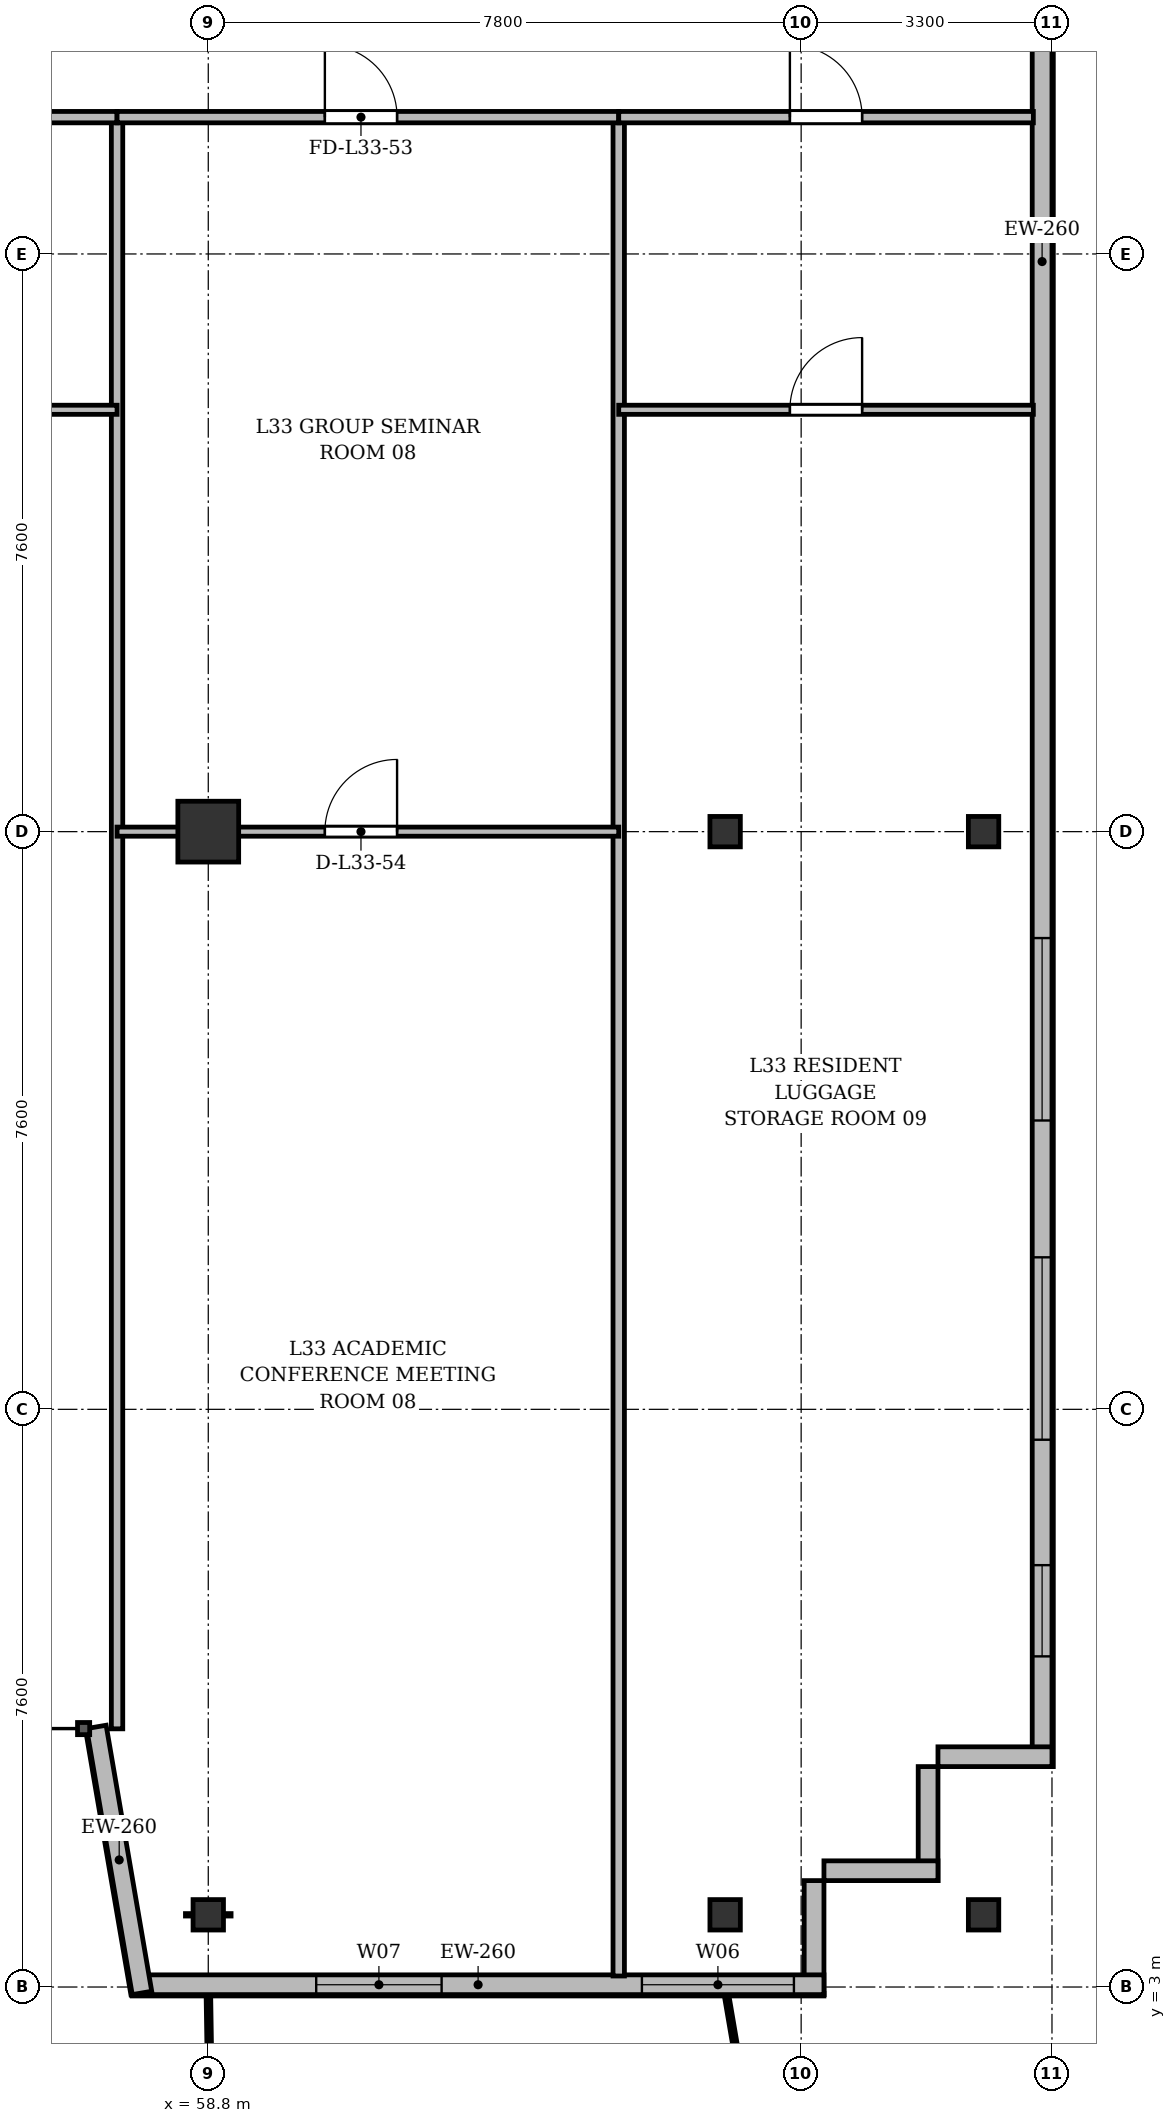
"""IFC4 building model, lengths in metres.
Left out: names, types, materials, properties, quantities, classifications, styles, units other than length and angle.
Written with IfcOpenShell. Run it as: python <this file> out.ifc"""

import sys

from ifc_helpers import new_model, si_unit, direction, frame, frame_2d, origin, origin_2d, place, context, subcontext, project, spatial, rectangle, i_section, extrude, source, transform, mapped, element, fill, save


model = new_model("IFC4")
c1 = context("Model", 3, precision=1e-05, world=origin(), true_north=direction((0.0, 1.0)))
c2 = subcontext(c1, "Body", "Model", "MODEL_VIEW")
j1 = project(units=[si_unit("LENGTHUNIT", "METRE"), si_unit("PLANEANGLEUNIT", "RADIAN")], contexts=[c1])
p1 = place(None, origin())
s1 = spatial("IfcSite", under=j1, at=p1, CompositionType="ELEMENT")
p2 = place(p1, origin())
s2 = spatial("IfcBuilding", under=s1, at=p2, CompositionType="ELEMENT")
p3 = place(p2, frame((0.0, 0.0, 128.5)))
s3 = spatial("IfcBuildingStorey", under=s2, at=p3, CompositionType="ELEMENT", Elevation=128.5)
m1 = source(origin(), c2, "Body", "SweptSolid", [
    extrude(i_section(OverallWidth=0.4, OverallDepth=0.4, WebThickness=0.022, FlangeThickness=0.035, at=origin_2d()), origin(), (0.0, 0.0, 1.0), 3.6),
])
p4 = place(p3, frame((58.8, 3.95, 0.0), z_axis=(0.0, 0.0, 1.0), x_axis=(1.0, 0.0, 0.0)))
e1 = element("IfcColumn", 1, at=p4, inside=s3, PredefinedType="COLUMN", context=c2, shape_type="MappedRepresentation", body=[
    mapped(m1, transform((0.0, 0.0, 0.0), x_axis=(1.0, 0.0, 0.0), y_axis=(0.0, 1.0, 0.0), z_axis=(0.0, 0.0, 1.0), scale=1.0)),
])
m2 = source(origin(), c2, "Body", "SweptSolid", [
    extrude(rectangle(XDim=0.8, YDim=0.8, at=origin_2d()), origin(), (0.0, 0.0, 1.0), 3.6),
])
p5 = place(p3, frame((58.8, 18.2, 0.0), z_axis=(0.0, 0.0, 1.0), x_axis=(1.0, 0.0, 0.0)))
e2 = element("IfcColumn", 2, at=p5, inside=s3, PredefinedType="COLUMN", context=c2, shape_type="MappedRepresentation", body=[
    mapped(m2, transform((0.0, 0.0, 0.0), x_axis=(1.0, 0.0, 0.0), y_axis=(0.0, 1.0, 0.0), z_axis=(0.0, 0.0, 1.0), scale=1.0)),
])
for number, where, z_axis, x_axis in (
    (3, (65.6, 3.95, 0.0), (0.0, 0.0, 1.0), (1.0, 0.0, 0.0)),
    (4, (65.6, 18.2, 0.0), (0.0, 0.0, 1.0), (1.0, 0.0, 0.0)),
    (5, (69.0, 3.95, 0.0), (0.0, 0.0, 1.0), (1.0, 0.0, 0.0)),
    (6, (69.0, 18.2, 0.0), (0.0, 0.0, 1.0), (1.0, 0.0, 0.0)),
):
    element("IfcColumn", number, at=place(p3, frame(where, z_axis=z_axis, x_axis=x_axis)), inside=s3, PredefinedType="COLUMN", context=c2, shape_type="MappedRepresentation", body=[
        mapped(m1, transform((0.0, 0.0, 0.0), x_axis=(1.0, 0.0, 0.0), y_axis=(0.0, 1.0, 0.0), z_axis=(0.0, 0.0, 1.0), scale=1.0)),
    ])
p6 = place(p3, frame((69.77, 45.5, 0.0), z_axis=(0.0, 0.0, 1.0), x_axis=(0.0, -1.0, 0.0)))
e7 = element("IfcWall", 7, at=p6, inside=s3, PredefinedType="SOLIDWALL", context=c2, shape_type="SweptSolid", body=[
    extrude(rectangle(XDim=39.6, YDim=0.26, at=frame_2d((19.8, 0.0))), origin(), (0.0, 0.0, 1.0), 2.632),
])
p7 = place(p6, frame((36.95, 0.0, 0.92)))
e8 = element("IfcOpeningElement", 8, at=p7, cuts=e7, PredefinedType="OPENING", context=c2, shape_type="SweptSolid", body=[
    extrude(rectangle(XDim=1.2, YDim=1.61, at=frame_2d((0.6, 0.805))), frame((0.0, 0.14, 0.0), z_axis=(0.0, -1.0, 0.0), x_axis=(1.0, 0.0, 0.0)), (0.0, 0.0, 1.0), 0.28),
])
p8 = place(p6, frame((32.9, 0.0, 0.92)))
e9 = element("IfcOpeningElement", 9, at=p8, cuts=e7, PredefinedType="OPENING", context=c2, shape_type="SweptSolid", body=[
    extrude(rectangle(XDim=2.4, YDim=1.61, at=frame_2d((1.2, 0.805))), frame((0.0, 0.14, 0.0), z_axis=(0.0, -1.0, 0.0), x_axis=(1.0, 0.0, 0.0)), (0.0, 0.0, 1.0), 0.28),
])
p9 = place(p6, frame((28.7, 0.0, 0.92)))
e10 = element("IfcOpeningElement", 10, at=p9, cuts=e7, PredefinedType="OPENING", context=c2, shape_type="SweptSolid", body=[
    extrude(rectangle(XDim=2.4, YDim=1.61, at=frame_2d((1.2, 0.805))), frame((0.0, 0.14, 0.0), z_axis=(0.0, -1.0, 0.0), x_axis=(1.0, 0.0, 0.0)), (0.0, 0.0, 1.0), 0.28),
])
p10 = place(p6, frame((7.5, 0.0, 0.92)))
e11 = element("IfcOpeningElement", 11, at=p10, cuts=e7, PredefinedType="OPENING", context=c2, shape_type="SweptSolid", body=[
    extrude(rectangle(XDim=2.4, YDim=1.61, at=frame_2d((1.2, 0.805))), frame((0.0, 0.14, 0.0), z_axis=(0.0, -1.0, 0.0), x_axis=(1.0, 0.0, 0.0)), (0.0, 0.0, 1.0), 0.28),
])
p11 = place(p6, frame((4.5, 0.0, 0.92)))
e12 = element("IfcOpeningElement", 12, at=p11, cuts=e7, PredefinedType="OPENING", context=c2, shape_type="SweptSolid", body=[
    extrude(rectangle(XDim=1.2, YDim=1.61, at=frame_2d((0.6, 0.805))), frame((0.0, 0.14, 0.0), z_axis=(0.0, -1.0, 0.0), x_axis=(1.0, 0.0, 0.0)), (0.0, 0.0, 1.0), 0.28),
])
p12 = place(p6, frame((1.15, 0.0, 0.92)))
e13 = element("IfcOpeningElement", 13, at=p12, cuts=e7, PredefinedType="OPENING", context=c2, shape_type="SweptSolid", body=[
    extrude(rectangle(XDim=1.2, YDim=1.61, at=frame_2d((0.6, 0.805))), frame((0.0, 0.14, 0.0), z_axis=(0.0, -1.0, 0.0), x_axis=(1.0, 0.0, 0.0)), (0.0, 0.0, 1.0), 0.28),
])
p13 = place(p3, frame((69.9, 6.03, 0.0), z_axis=(0.0, 0.0, 1.0), x_axis=(-1.0, 0.0, 0.0)))
e14 = element("IfcWall", 14, at=p13, inside=s3, PredefinedType="SOLIDWALL", context=c2, shape_type="SweptSolid", body=[
    extrude(rectangle(XDim=1.5, YDim=0.26, at=frame_2d((0.75, 0.0))), origin(), (0.0, 0.0, 1.0), 2.72),
])
for number, where, z_axis, x_axis in (
    (15, (68.27, 5.9, 0.0), (0.0, 0.0, 1.0), (0.0, -1.0, 0.0)),
    (16, (68.4, 4.53, 0.0), (0.0, 0.0, 1.0), (-1.0, 0.0, 0.0)),
):
    element("IfcWall", number, at=place(p3, frame(where, z_axis=z_axis, x_axis=x_axis)), inside=s3, PredefinedType="SOLIDWALL", context=c2, shape_type="SweptSolid", body=[
        extrude(rectangle(XDim=1.5, YDim=0.26, at=frame_2d((0.75, 0.0))), origin(), (0.0, 0.0, 1.0), 3.22),
    ])
p14 = place(p3, frame((66.77, 4.4, 0.0), z_axis=(0.0, 0.0, 1.0), x_axis=(0.0, -1.0, 0.0)))
e17 = element("IfcWall", 17, at=p14, inside=s3, PredefinedType="SOLIDWALL", context=c2, shape_type="SweptSolid", body=[
    extrude(rectangle(XDim=1.5, YDim=0.26, at=frame_2d((0.75, 0.0))), origin(), (0.0, 0.0, 1.0), 2.632),
])
p15 = place(p3, frame((66.9, 3.03, 0.0), z_axis=(0.0, 0.0, 1.0), x_axis=(-1.0, 0.0, 0.0)))
e18 = element("IfcWall", 18, at=p15, inside=s3, PredefinedType="SOLIDWALL", context=c2, shape_type="SweptSolid", body=[
    extrude(rectangle(XDim=9.1, YDim=0.26, at=frame_2d((4.55, 0.0))), origin(), (0.0, 0.0, 1.0), 3.22),
])
p16 = place(p15, frame((0.395, 0.0, 0.9)))
e19 = element("IfcOpeningElement", 19, at=p16, cuts=e18, PredefinedType="OPENING", context=c2, shape_type="SweptSolid", body=[
    extrude(rectangle(XDim=2.0, YDim=1.95, at=frame_2d((1.0, 0.975))), frame((0.0, 0.14, 0.0), z_axis=(0.0, -1.0, 0.0), x_axis=(1.0, 0.0, 0.0)), (0.0, 0.0, 1.0), 0.28),
])
p17 = place(p15, frame((5.03, 0.0, 0.9)))
e20 = element("IfcOpeningElement", 20, at=p17, cuts=e18, PredefinedType="OPENING", context=c2, shape_type="SweptSolid", body=[
    extrude(rectangle(XDim=1.65, YDim=1.85, at=frame_2d((0.825, 0.925))), frame((0.0, 0.14, 0.0), z_axis=(0.0, -1.0, 0.0), x_axis=(1.0, 0.0, 0.0)), (0.0, 0.0, 1.0), 0.28),
])
p18 = place(p3, frame((57.928, 2.922, 0.0), z_axis=(0.0, 0.0, 1.0), x_axis=(-0.168923741424, 0.98562912375, 0.0)))
e21 = element("IfcWall", 21, at=p18, inside=s3, PredefinedType="SOLIDWALL", context=c2, shape_type="SweptSolid", body=[
    extrude(rectangle(XDim=3.551, YDim=0.26, at=frame_2d((1.775, 0.0))), origin(), (0.0, 0.0, 1.0), 2.632),
])
p19 = place(p3, frame((57.6, 6.397, 0.0), z_axis=(0.0, 0.0, 1.0), x_axis=(0.0, 1.0, 0.0)))
e22 = element("IfcWall", 22, at=p19, inside=s3, PredefinedType="PARTITIONING", context=c2, shape_type="SweptSolid", body=[
    extrude(rectangle(XDim=21.203, YDim=0.15, at=frame_2d((10.602, 0.0))), origin(), (0.0, 0.0, 1.0), 2.632),
])
p20 = place(p3, frame((64.2, 3.145, 0.0), z_axis=(0.0, 0.0, 1.0), x_axis=(0.0, 1.0, 0.0)))
e23 = element("IfcWall", 23, at=p20, inside=s3, PredefinedType="PARTITIONING", context=c2, shape_type="SweptSolid", body=[
    extrude(rectangle(XDim=24.455, YDim=0.15, at=frame_2d((12.228, 0.0))), origin(), (0.0, 0.0, 1.0), 2.632),
])
p21 = place(p3, frame((51.0, 27.6, 0.0), z_axis=(0.0, 0.0, 1.0), x_axis=(1.0, 0.0, 0.0)))
e24 = element("IfcWall", 24, at=p21, inside=s3, PredefinedType="PARTITIONING", context=c2, shape_type="SweptSolid", body=[
    extrude(rectangle(XDim=6.6, YDim=0.15, at=frame_2d((3.3, 0.0))), origin(), (0.0, 0.0, 1.0), 2.72),
])
p22 = place(p21, frame((2.734, 0.0, 0.0)))
e25 = element("IfcOpeningElement", 25, at=p22, cuts=e24, PredefinedType="OPENING", context=c2, shape_type="SweptSolid", body=[
    extrude(rectangle(XDim=0.95, YDim=2.15, at=frame_2d((0.475, 1.075))), frame((0.0, 0.085, 0.0), z_axis=(0.0, -1.0, 0.0), x_axis=(1.0, 0.0, 0.0)), (0.0, 0.0, 1.0), 0.17),
])
p23 = place(p3, frame((51.0, 23.75, 0.0), z_axis=(0.0, 0.0, 1.0), x_axis=(1.0, 0.0, 0.0)))
e26 = element("IfcWall", 26, at=p23, inside=s3, PredefinedType="PARTITIONING", context=c2, shape_type="SweptSolid", body=[
    extrude(rectangle(XDim=6.6, YDim=0.12, at=frame_2d((3.3, 0.0))), origin(), (0.0, 0.0, 1.0), 2.72),
])
p24 = place(p23, frame((2.734, 0.0, 0.0)))
e27 = element("IfcOpeningElement", 27, at=p24, cuts=e26, PredefinedType="OPENING", context=c2, shape_type="SweptSolid", body=[
    extrude(rectangle(XDim=0.95, YDim=2.15, at=frame_2d((0.475, 1.075))), frame((0.0, 0.07, 0.0), z_axis=(0.0, -1.0, 0.0), x_axis=(1.0, 0.0, 0.0)), (0.0, 0.0, 1.0), 0.14),
])
p25 = place(p3, frame((57.6, 27.6, 0.0), z_axis=(0.0, 0.0, 1.0), x_axis=(1.0, 0.0, 0.0)))
e28 = element("IfcWall", 28, at=p25, inside=s3, PredefinedType="PARTITIONING", context=c2, shape_type="SweptSolid", body=[
    extrude(rectangle(XDim=6.6, YDim=0.15, at=frame_2d((3.3, 0.0))), origin(), (0.0, 0.0, 1.0), 2.72),
])
p26 = place(p25, frame((2.734, 0.0, 0.0)))
e29 = element("IfcOpeningElement", 29, at=p26, cuts=e28, PredefinedType="OPENING", context=c2, shape_type="SweptSolid", body=[
    extrude(rectangle(XDim=0.95, YDim=2.15, at=frame_2d((0.475, 1.075))), frame((0.0, 0.085, 0.0), z_axis=(0.0, -1.0, 0.0), x_axis=(1.0, 0.0, 0.0)), (0.0, 0.0, 1.0), 0.17),
])
p27 = place(p3, frame((57.6, 18.2, 0.0), z_axis=(0.0, 0.0, 1.0), x_axis=(1.0, 0.0, 0.0)))
e30 = element("IfcWall", 30, at=p27, inside=s3, PredefinedType="PARTITIONING", context=c2, shape_type="SweptSolid", body=[
    extrude(rectangle(XDim=6.6, YDim=0.12, at=frame_2d((3.3, 0.0))), origin(), (0.0, 0.0, 1.0), 2.632),
])
p28 = place(p27, frame((2.734, 0.0, 0.0)))
e31 = element("IfcOpeningElement", 31, at=p28, cuts=e30, PredefinedType="OPENING", context=c2, shape_type="SweptSolid", body=[
    extrude(rectangle(XDim=0.95, YDim=2.15, at=frame_2d((0.475, 1.075))), frame((0.0, 0.07, 0.0), z_axis=(0.0, -1.0, 0.0), x_axis=(1.0, 0.0, 0.0)), (0.0, 0.0, 1.0), 0.14),
])
p29 = place(p3, frame((64.2, 27.6, 0.0), z_axis=(0.0, 0.0, 1.0), x_axis=(1.0, 0.0, 0.0)))
e32 = element("IfcWall", 32, at=p29, inside=s3, PredefinedType="PARTITIONING", context=c2, shape_type="SweptSolid", body=[
    extrude(rectangle(XDim=5.455, YDim=0.15, at=frame_2d((2.728, 0.0))), origin(), (0.0, 0.0, 1.0), 2.72),
])
p30 = place(p29, frame((2.252, 0.0, 0.0)))
e33 = element("IfcOpeningElement", 33, at=p30, cuts=e32, PredefinedType="OPENING", context=c2, shape_type="SweptSolid", body=[
    extrude(rectangle(XDim=0.95, YDim=2.15, at=frame_2d((0.475, 1.075))), frame((0.0, 0.085, 0.0), z_axis=(0.0, -1.0, 0.0), x_axis=(1.0, 0.0, 0.0)), (0.0, 0.0, 1.0), 0.17),
])
p31 = place(p3, frame((64.2, 23.75, 0.0), z_axis=(0.0, 0.0, 1.0), x_axis=(1.0, 0.0, 0.0)))
e34 = element("IfcWall", 34, at=p31, inside=s3, PredefinedType="PARTITIONING", context=c2, shape_type="SweptSolid", body=[
    extrude(rectangle(XDim=5.455, YDim=0.12, at=frame_2d((2.728, 0.0))), origin(), (0.0, 0.0, 1.0), 2.72),
])
p32 = place(p31, frame((2.252, 0.0, 0.0)))
e35 = element("IfcOpeningElement", 35, at=p32, cuts=e34, PredefinedType="OPENING", context=c2, shape_type="SweptSolid", body=[
    extrude(rectangle(XDim=0.95, YDim=2.15, at=frame_2d((0.475, 1.075))), frame((0.0, 0.07, 0.0), z_axis=(0.0, -1.0, 0.0), x_axis=(1.0, 0.0, 0.0)), (0.0, 0.0, 1.0), 0.14),
])
m3 = source(origin(), c2, "Body", "SweptSolid", [
    extrude(rectangle(XDim=1.2, YDim=1.61, at=frame_2d((0.6, 0.805))), frame((0.0, 0.03, 0.0), z_axis=(0.0, -1.0, 0.0), x_axis=(1.0, 0.0, 0.0)), (0.0, 0.0, 1.0), 0.06),
])
p33 = place(p7, origin())
e36 = element("IfcWindow", 36, at=p33, inside=s3, PartitioningType="SINGLE_PANEL", PredefinedType="WINDOW", context=c2, shape_type="MappedRepresentation", body=[
    mapped(m3, transform((0.0, 0.0, 0.0), x_axis=(1.0, 0.0, 0.0), y_axis=(0.0, 1.0, 0.0), z_axis=(0.0, 0.0, 1.0), scale=1.0)),
])
fill(e8, e36)
m4 = source(origin(), c2, "Body", "SweptSolid", [
    extrude(rectangle(XDim=2.4, YDim=1.61, at=frame_2d((1.2, 0.805))), frame((0.0, 0.03, 0.0), z_axis=(0.0, -1.0, 0.0), x_axis=(1.0, 0.0, 0.0)), (0.0, 0.0, 1.0), 0.06),
])
p34 = place(p8, origin())
e37 = element("IfcWindow", 37, at=p34, inside=s3, PartitioningType="SINGLE_PANEL", PredefinedType="WINDOW", context=c2, shape_type="MappedRepresentation", body=[
    mapped(m4, transform((0.0, 0.0, 0.0), x_axis=(1.0, 0.0, 0.0), y_axis=(0.0, 1.0, 0.0), z_axis=(0.0, 0.0, 1.0), scale=1.0)),
])
fill(e9, e37)
p35 = place(p9, origin())
e38 = element("IfcWindow", 38, at=p35, inside=s3, PartitioningType="SINGLE_PANEL", PredefinedType="WINDOW", context=c2, shape_type="MappedRepresentation", body=[
    mapped(m4, transform((0.0, 0.0, 0.0), x_axis=(1.0, 0.0, 0.0), y_axis=(0.0, 1.0, 0.0), z_axis=(0.0, 0.0, 1.0), scale=1.0)),
])
fill(e10, e38)
m5 = source(origin(), c2, "Body", "SweptSolid", [
    extrude(rectangle(XDim=2.0, YDim=1.95, at=frame_2d((1.0, 0.975))), frame((0.0, 0.03, 0.0), z_axis=(0.0, -1.0, 0.0), x_axis=(1.0, 0.0, 0.0)), (0.0, 0.0, 1.0), 0.06),
])
p36 = place(p16, origin())
e39 = element("IfcWindow", 39, at=p36, inside=s3, PartitioningType="SINGLE_PANEL", PredefinedType="WINDOW", context=c2, shape_type="MappedRepresentation", body=[
    mapped(m5, transform((0.0, 0.0, 0.0), x_axis=(1.0, 0.0, 0.0), y_axis=(0.0, 1.0, 0.0), z_axis=(0.0, 0.0, 1.0), scale=1.0)),
])
fill(e19, e39)
m6 = source(origin(), c2, "Body", "SweptSolid", [
    extrude(rectangle(XDim=1.65, YDim=1.85, at=frame_2d((0.825, 0.925))), frame((0.0, 0.03, 0.0), z_axis=(0.0, -1.0, 0.0), x_axis=(1.0, 0.0, 0.0)), (0.0, 0.0, 1.0), 0.06),
])
p37 = place(p17, origin())
e40 = element("IfcWindow", 40, at=p37, inside=s3, PartitioningType="SINGLE_PANEL", PredefinedType="WINDOW", context=c2, shape_type="MappedRepresentation", body=[
    mapped(m6, transform((0.0, 0.0, 0.0), x_axis=(1.0, 0.0, 0.0), y_axis=(0.0, 1.0, 0.0), z_axis=(0.0, 0.0, 1.0), scale=1.0)),
])
fill(e20, e40)
m7 = source(origin(), c2, "Body", "SweptSolid", [
    extrude(rectangle(XDim=0.95, YDim=2.15, at=frame_2d((0.475, 1.075))), frame((0.0, 0.025, 0.0), z_axis=(0.0, -1.0, 0.0), x_axis=(1.0, 0.0, 0.0)), (0.0, 0.0, 1.0), 0.05),
])
p38 = place(p26, origin())
e41 = element("IfcDoor", 41, at=p38, inside=s3, OperationType="SINGLE_SWING_LEFT", PredefinedType="DOOR", context=c2, shape_type="MappedRepresentation", body=[
    mapped(m7, transform((0.0, 0.0, 0.0), x_axis=(1.0, 0.0, 0.0), y_axis=(0.0, 1.0, 0.0), z_axis=(0.0, 0.0, 1.0), scale=1.0)),
])
fill(e29, e41)
p39 = place(p28, origin())
e42 = element("IfcDoor", 42, at=p39, inside=s3, OperationType="SINGLE_SWING_RIGHT", PredefinedType="DOOR", context=c2, shape_type="MappedRepresentation", body=[
    mapped(m7, transform((0.0, 0.0, 0.0), x_axis=(1.0, 0.0, 0.0), y_axis=(0.0, 1.0, 0.0), z_axis=(0.0, 0.0, 1.0), scale=1.0)),
])
fill(e31, e42)
p40 = place(p30, origin())
e43 = element("IfcDoor", 43, at=p40, inside=s3, OperationType="SINGLE_SWING_LEFT", PredefinedType="DOOR", context=c2, shape_type="MappedRepresentation", body=[
    mapped(m7, transform((0.0, 0.0, 0.0), x_axis=(1.0, 0.0, 0.0), y_axis=(0.0, 1.0, 0.0), z_axis=(0.0, 0.0, 1.0), scale=1.0)),
])
fill(e33, e43)
p41 = place(p32, origin())
e44 = element("IfcDoor", 44, at=p41, inside=s3, OperationType="SINGLE_SWING_RIGHT", PredefinedType="DOOR", context=c2, shape_type="MappedRepresentation", body=[
    mapped(m7, transform((0.0, 0.0, 0.0), x_axis=(1.0, 0.0, 0.0), y_axis=(0.0, 1.0, 0.0), z_axis=(0.0, 0.0, 1.0), scale=1.0)),
])
fill(e35, e44)
save(model, sys.argv[1])
